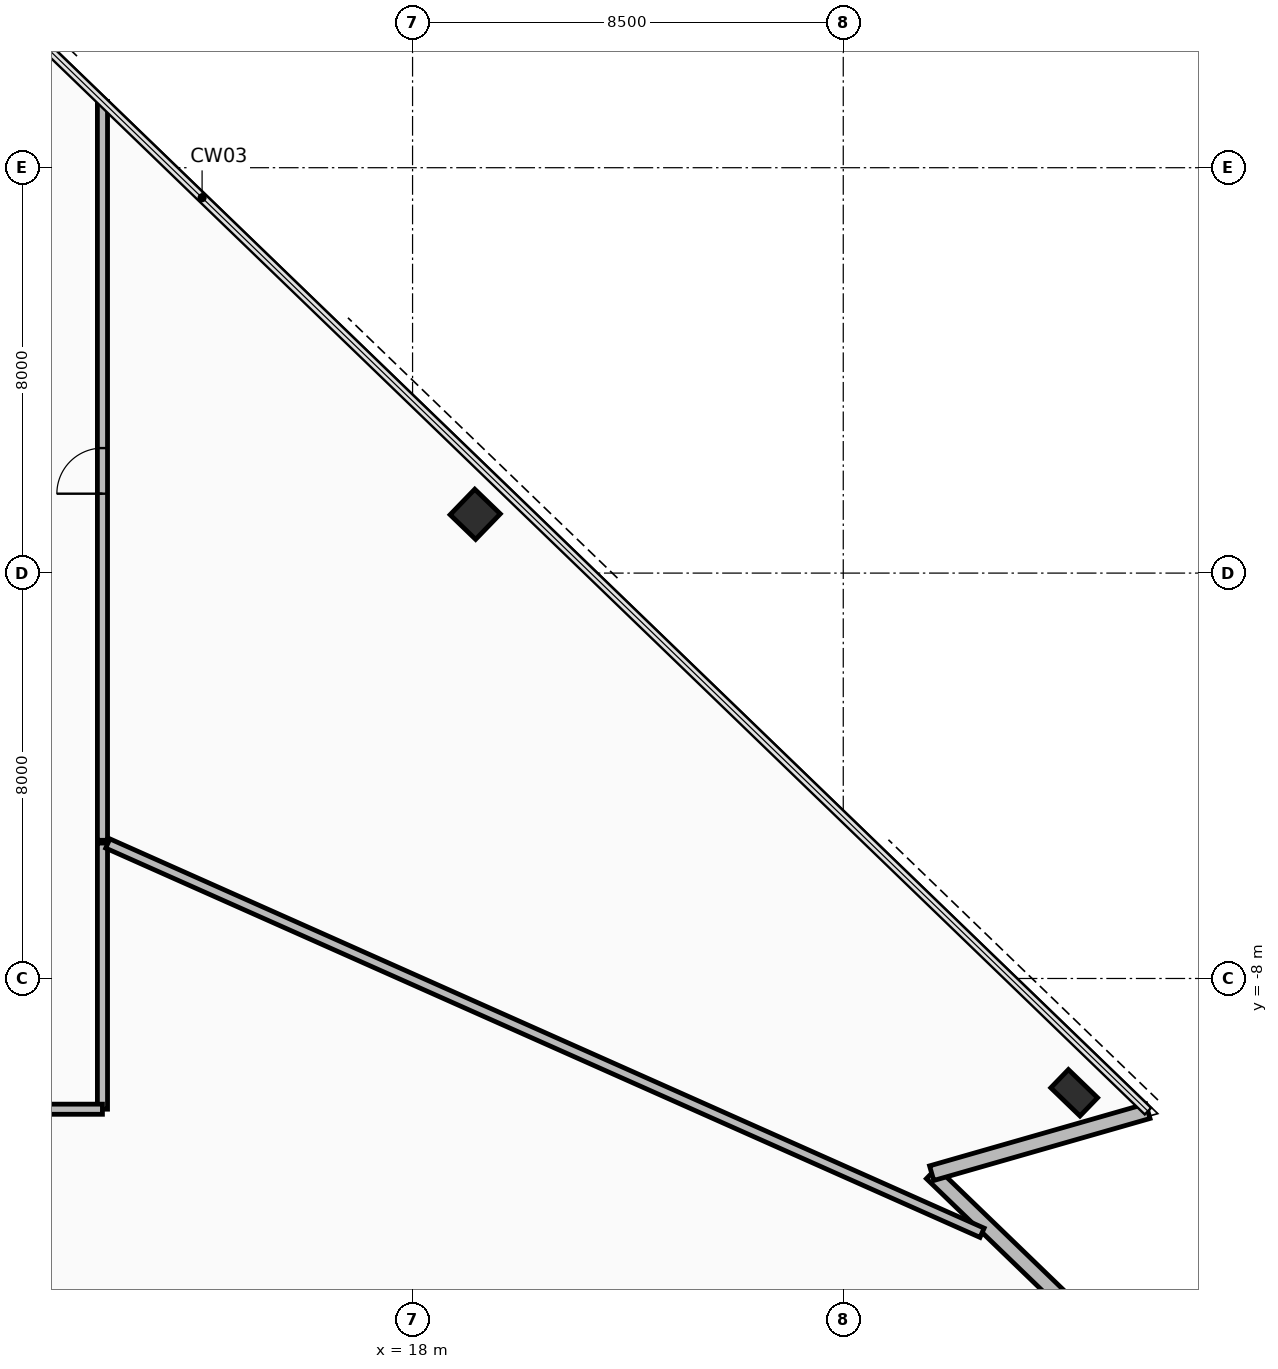
"""IFC4 building model, lengths in metres.
Left out: names, types, materials, properties, quantities, classifications, styles, units other than length and angle.
Written with IfcOpenShell. Run it as: python <this file> out.ifc"""

import sys

from ifc_helpers import new_model, si_unit, direction, frame, frame_2d, origin, origin_2d, place, context, subcontext, project, spatial, rectangle, hollow_rectangle, extrude, element, fill, save


model = new_model("IFC4")
c1 = context("Model", 3, precision=1e-05, world=origin(), true_north=direction((0.0, 1.0)))
c2 = subcontext(c1, "Body", "Model", "MODEL_VIEW")
j1 = project(units=[si_unit("LENGTHUNIT", "METRE"), si_unit("PLANEANGLEUNIT", "RADIAN")], contexts=[c1])
p1 = place(None, origin())
s1 = spatial("IfcSite", under=j1, at=p1, CompositionType="ELEMENT")
p2 = place(p1, origin())
s2 = spatial("IfcBuilding", under=s1, at=p2, CompositionType="ELEMENT")
p3 = place(p2, frame((0.0, 0.0, 96.9)))
s3 = spatial("IfcBuildingStorey", under=s2, at=p3, CompositionType="ELEMENT", Elevation=96.9)
for number, where, z_axis, x_axis in (
    (1, (29.983, -14.564, 0.0), (0.0, 0.0, 1.0), (0.961, 0.276, 0.0)),
    (2, (31.058, -10.256, 0.0), (0.0, 0.0, 1.0), (-0.719, 0.695, 0.0)),
):
    element("IfcColumn", number, at=place(p3, frame(where, z_axis=z_axis, x_axis=x_axis)), inside=s3, PredefinedType="COLUMN", context=c2, shape_type="SweptSolid", body=[
        extrude(hollow_rectangle(XDim=0.5, YDim=0.8, WallThickness=0.04, at=origin_2d()), origin(), (0.0, 0.0, 1.0), 3.6),
    ])
p4 = place(p3, frame((19.236, 1.16, 0.0), z_axis=(0.0, 0.0, 1.0), x_axis=(-0.719339800339, 0.694658370459, 0.0)))
e3 = element("IfcColumn", 3, at=p4, inside=s3, PredefinedType="COLUMN", context=c2, shape_type="SweptSolid", body=[
    extrude(hollow_rectangle(XDim=0.7, YDim=0.7, WallThickness=0.04, at=origin_2d()), origin(), (0.0, 0.0, 1.0), 3.6),
])
p5 = place(p3, frame((31.439, -14.927, 0.0), z_axis=(0.0, 0.0, 1.0), x_axis=(-0.719317126864, 0.694681848763, 0.0)))
e4 = element("IfcWall", 4, at=p5, inside=s3, PredefinedType="STANDARD", context=c2, shape_type="SweptSolid", body=[
    extrude(rectangle(XDim=4.44, YDim=0.3, at=frame_2d((2.22, 0.0))), origin(), (0.0, 0.0, 1.0), 2.605),
])
p6 = place(p3, frame((28.245, -11.842, 0.0), z_axis=(0.0, 0.0, 1.0), x_axis=(0.961255810825, 0.275657878821, 0.0)))
e5 = element("IfcWall", 5, at=p6, inside=s3, PredefinedType="STANDARD", context=c2, shape_type="SweptSolid", body=[
    extrude(rectangle(XDim=4.44, YDim=0.3, at=frame_2d((2.22, 0.0))), origin(), (0.0, 0.0, 1.0), 2.605),
])
p7 = place(p3, frame((11.88, -10.579, 0.0), z_axis=(0.0, 0.0, 1.0), x_axis=(0.0, 1.0, 0.0)))
e6 = element("IfcWall", 6, at=p7, inside=s3, PredefinedType="PARTITIONING", context=c2, shape_type="SweptSolid", body=[
    extrude(rectangle(XDim=5.251, YDim=0.2, at=frame_2d((2.626, 0.0))), origin(), (0.0, 0.0, 1.0), 2.805),
])
p8 = place(p3, frame((11.985, -5.336, 0.0), z_axis=(0.0, 0.0, 1.0), x_axis=(0.913548038419, -0.406730846507, 0.0)))
e7 = element("IfcWall", 7, at=p8, inside=s3, PredefinedType="PARTITIONING", context=c2, shape_type="SweptSolid", body=[
    extrude(rectangle(XDim=18.887, YDim=0.2, at=frame_2d((9.444, 0.0))), origin(), (0.0, 0.0, 1.0), 2.805),
])
p9 = place(p3, frame((3.472, -10.58, 0.0), z_axis=(0.0, 0.0, 1.0), x_axis=(1.0, 0.0, 0.0)))
e8 = element("IfcWall", 8, at=p9, inside=s3, PredefinedType="PARTITIONING", context=c2, shape_type="SweptSolid", body=[
    extrude(rectangle(XDim=8.407, YDim=0.2, at=frame_2d((4.204, 0.0))), origin(), (0.0, 0.0, 1.0), 2.805),
])
p10 = place(p9, frame((3.779, 0.0, 0.0)))
e9 = element("IfcOpeningElement", 9, at=p10, cuts=e8, PredefinedType="OPENING", context=c2, shape_type="SweptSolid", body=[
    extrude(rectangle(XDim=0.85, YDim=2.1, at=frame_2d((0.425, 1.05))), frame((0.0, 0.11, 0.0), z_axis=(0.0, -1.0, 0.0), x_axis=(1.0, 0.0, 0.0)), (0.0, 0.0, 1.0), 0.22),
])
p11 = place(p3, frame((11.88, -5.273, 0.0), z_axis=(0.0, 0.0, 1.0), x_axis=(0.0, 1.0, 0.0)))
e10 = element("IfcWall", 10, at=p11, inside=s3, PredefinedType="PARTITIONING", context=c2, shape_type="SweptSolid", body=[
    extrude(rectangle(XDim=14.58, YDim=0.2, at=frame_2d((7.29, 0.0))), origin(), (0.0, 0.0, 1.0), 2.605),
])
p12 = place(p11, frame((6.84, 0.0, 0.0)))
e11 = element("IfcOpeningElement", 11, at=p12, cuts=e10, PredefinedType="OPENING", context=c2, shape_type="SweptSolid", body=[
    extrude(rectangle(XDim=0.9, YDim=2.1, at=frame_2d((0.45, 1.05))), frame((0.0, 0.11, 0.0), z_axis=(0.0, -1.0, 0.0), x_axis=(1.0, 0.0, 0.0)), (0.0, 0.0, 1.0), 0.22),
])
p13 = place(p12, origin())
e12 = element("IfcDoor", 12, at=p13, inside=s3, OperationType="SINGLE_SWING_LEFT", PredefinedType="DOOR", context=c2, shape_type="SweptSolid", body=[
    extrude(rectangle(XDim=0.9, YDim=2.1, at=frame_2d((0.45, 1.05))), frame((0.0, 0.025, 0.0), z_axis=(0.0, -1.0, 0.0), x_axis=(1.0, 0.0, 0.0)), (0.0, 0.0, 1.0), 0.05),
])
fill(e11, e12)
save(model, sys.argv[1])
